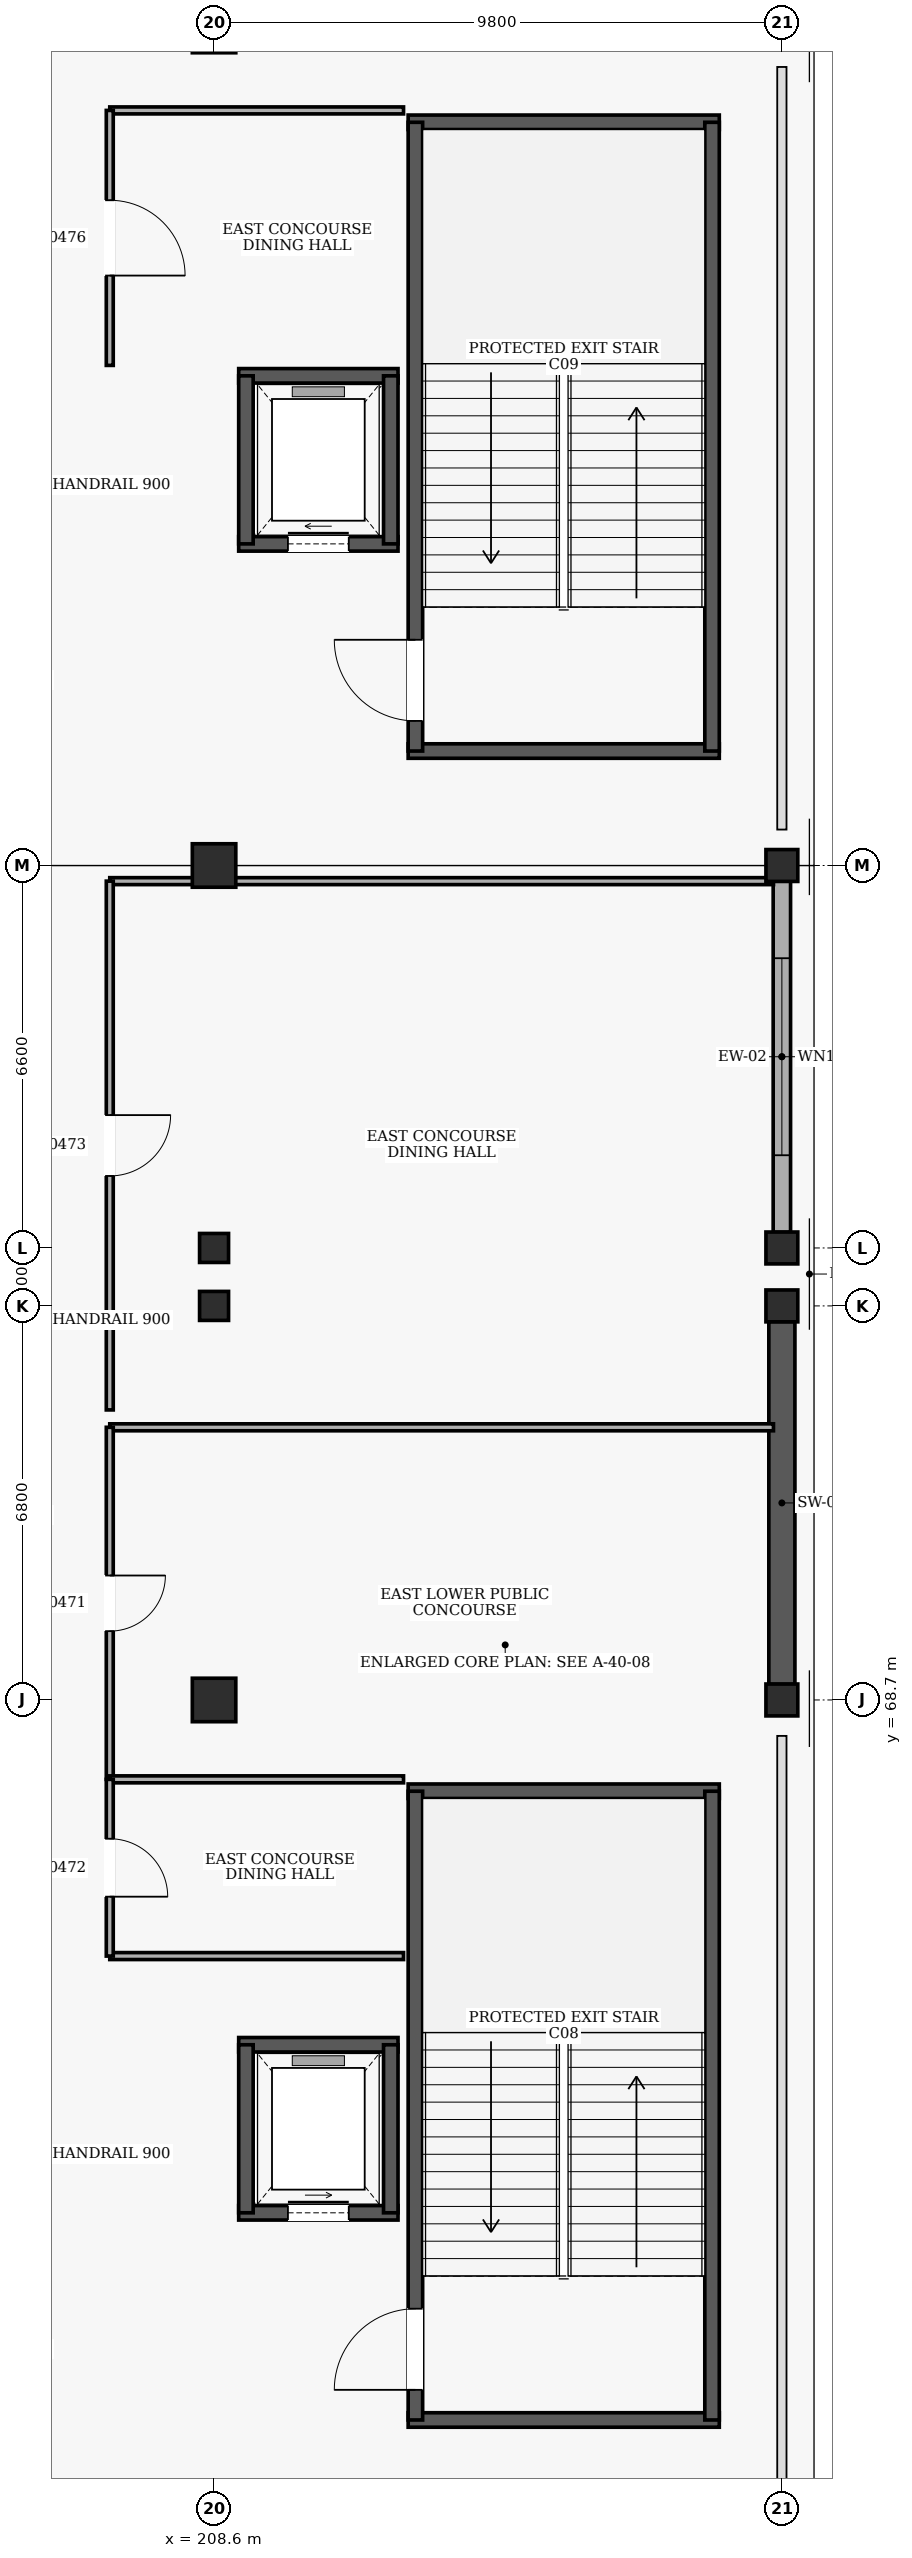
"""IFC4 building model, lengths in metres.
Left out: names, types, materials, properties, quantities, classifications, styles, units other than length and angle.
Written with IfcOpenShell. Run it as: python <this file> out.ifc"""

import sys

from ifc_helpers import new_model, si_unit, direction, frame, frame_2d, origin, origin_2d, place, context, subcontext, project, spatial, rectangle, extrude, element, fill, save


model = new_model("IFC4")
c1 = context("Model", 3, precision=1e-05, world=origin(), true_north=direction((0.0, 1.0)))
c2 = subcontext(c1, "Body", "Model", "MODEL_VIEW")
j1 = project(units=[si_unit("LENGTHUNIT", "METRE"), si_unit("PLANEANGLEUNIT", "RADIAN")], contexts=[c1])
p1 = place(None, origin())
s1 = spatial("IfcSite", under=j1, at=p1, CompositionType="ELEMENT")
p2 = place(p1, origin())
s2 = spatial("IfcBuilding", under=s1, at=p2, CompositionType="ELEMENT")
p3 = place(p2, frame((0.0, 0.0, 5.4)))
s3 = spatial("IfcBuildingStorey", under=s2, at=p3, CompositionType="ELEMENT", Elevation=5.4)
p4 = place(p3, frame((208.6, 68.7, 0.0), z_axis=(0.0, 0.0, 1.0), x_axis=(1.0, 0.0, 0.0)))
e1 = element("IfcColumn", 1, at=p4, inside=s3, PredefinedType="COLUMN", context=c2, shape_type="SweptSolid", body=[
    extrude(rectangle(XDim=0.75, YDim=0.75, at=origin_2d()), origin(), (0.0, 0.0, 1.0), 4.8),
])
for number, where, z_axis, x_axis in (
    (2, (208.6, 75.5, 0.0), (0.0, 0.0, 1.0), (1.0, 0.0, 0.0)),
    (3, (208.6, 76.5, 0.0), (0.0, 0.0, 1.0), (1.0, 0.0, 0.0)),
):
    element("IfcColumn", number, at=place(p3, frame(where, z_axis=z_axis, x_axis=x_axis)), inside=s3, PredefinedType="COLUMN", context=c2, shape_type="SweptSolid", body=[
        extrude(rectangle(XDim=0.5, YDim=0.5, at=origin_2d()), origin(), (0.0, 0.0, 1.0), 4.8),
    ])
for number, where, z_axis, x_axis in (
    (4, (208.6, 83.1, 0.0), (0.0, 0.0, 1.0), (1.0, 0.0, 0.0)),
    (5, (208.6, 97.5, 0.0), (0.0, 0.0, 1.0), (1.0, 0.0, 0.0)),
):
    element("IfcColumn", number, at=place(p3, frame(where, z_axis=z_axis, x_axis=x_axis)), inside=s3, PredefinedType="COLUMN", context=c2, shape_type="SweptSolid", body=[
        extrude(rectangle(XDim=0.75, YDim=0.75, at=origin_2d()), origin(), (0.0, 0.0, 1.0), 4.8),
    ])
for number, where, z_axis, x_axis in (
    (6, (218.4, 68.7, 0.0), (0.0, 0.0, 1.0), (1.0, 0.0, 0.0)),
    (7, (218.4, 75.5, 0.0), (0.0, 0.0, 1.0), (1.0, 0.0, 0.0)),
    (8, (218.4, 76.5, 0.0), (0.0, 0.0, 1.0), (1.0, 0.0, 0.0)),
    (9, (218.4, 83.1, 0.0), (0.0, 0.0, 1.0), (1.0, 0.0, 0.0)),
):
    element("IfcColumn", number, at=place(p3, frame(where, z_axis=z_axis, x_axis=x_axis)), inside=s3, PredefinedType="COLUMN", context=c2, shape_type="SweptSolid", body=[
        extrude(rectangle(XDim=0.55, YDim=0.55, at=origin_2d()), origin(), (0.0, 0.0, 1.0), 4.8),
    ])
p5 = place(p3, frame((218.4, 82.83, 0.0), z_axis=(0.0, 0.0, 1.0), x_axis=(0.0, -1.0, 0.0)))
e10 = element("IfcWall", 10, at=p5, inside=s3, PredefinedType="SOLIDWALL", context=c2, shape_type="SweptSolid", body=[
    extrude(rectangle(XDim=6.06, YDim=0.3, at=frame_2d((3.03, 0.0))), origin(), (0.0, 0.0, 1.0), 3.98),
])
p6 = place(p5, frame((1.33, 0.0, 0.9)))
e11 = element("IfcOpeningElement", 11, at=p6, cuts=e10, PredefinedType="OPENING", context=c2, shape_type="SweptSolid", body=[
    extrude(rectangle(XDim=3.4, YDim=2.1, at=frame_2d((1.7, 1.05))), frame((0.0, 0.16, 0.0), z_axis=(0.0, -1.0, 0.0), x_axis=(1.0, 0.0, 0.0)), (0.0, 0.0, 1.0), 0.32),
])
p7 = place(p3, frame((218.4, 75.23, 0.0), z_axis=(0.0, 0.0, 1.0), x_axis=(0.0, -1.0, 0.0)))
e12 = element("IfcWall", 12, at=p7, inside=s3, PredefinedType="SHEAR", context=c2, shape_type="SweptSolid", body=[
    extrude(rectangle(XDim=6.26, YDim=0.45, at=frame_2d((3.13, 0.0))), origin(), (0.0, 0.0, 1.0), 3.88),
])
for number, where, z_axis, x_axis in (
    (13, (211.95, 56.275, 0.0), (0.0, 0.0, 1.0), (1.0, 0.0, 0.0)),
    (14, (217.32, 67.125, 0.0), (0.0, 0.0, 1.0), (-1.0, 0.0, 0.0)),
):
    element("IfcWall", number, at=place(p3, frame(where, z_axis=z_axis, x_axis=x_axis)), inside=s3, PredefinedType="SHEAR", context=c2, shape_type="SweptSolid", body=[
        extrude(rectangle(XDim=5.37, YDim=0.25, at=frame_2d((2.685, 0.0))), origin(), (0.0, 0.0, 1.0), 4.5),
    ])
p8 = place(p3, frame((212.075, 56.275, 0.0), z_axis=(0.0, 0.0, 1.0), x_axis=(0.0, 1.0, 0.0)))
e15 = element("IfcWall", 15, at=p8, inside=s3, PredefinedType="SHEAR", context=c2, shape_type="SweptSolid", body=[
    extrude(rectangle(XDim=10.85, YDim=0.25, at=frame_2d((5.425, 0.0))), origin(), (0.0, 0.0, 1.0), 4.5),
])
p9 = place(p8, frame((0.52, 0.0, 0.0)))
e16 = element("IfcOpeningElement", 16, at=p9, cuts=e15, PredefinedType="OPENING", context=c2, shape_type="SweptSolid", body=[
    extrude(rectangle(XDim=1.4, YDim=2.15, at=frame_2d((0.7, 1.075))), frame((0.0, 0.135, 0.0), z_axis=(0.0, -1.0, 0.0), x_axis=(1.0, 0.0, 0.0)), (0.0, 0.0, 1.0), 0.27),
])
p10 = place(p3, frame((217.195, 56.275, 0.0), z_axis=(0.0, 0.0, 1.0), x_axis=(0.0, 1.0, 0.0)))
e17 = element("IfcWall", 17, at=p10, inside=s3, PredefinedType="SHEAR", context=c2, shape_type="SweptSolid", body=[
    extrude(rectangle(XDim=10.85, YDim=0.25, at=frame_2d((5.425, 0.0))), origin(), (0.0, 0.0, 1.0), 4.5),
])
for number, where, z_axis, x_axis in (
    (18, (211.95, 85.075, 0.0), (0.0, 0.0, 1.0), (1.0, 0.0, 0.0)),
    (19, (217.32, 95.925, 0.0), (0.0, 0.0, 1.0), (-1.0, 0.0, 0.0)),
):
    element("IfcWall", number, at=place(p3, frame(where, z_axis=z_axis, x_axis=x_axis)), inside=s3, PredefinedType="SHEAR", context=c2, shape_type="SweptSolid", body=[
        extrude(rectangle(XDim=5.37, YDim=0.25, at=frame_2d((2.685, 0.0))), origin(), (0.0, 0.0, 1.0), 4.5),
    ])
p11 = place(p3, frame((212.075, 85.075, 0.0), z_axis=(0.0, 0.0, 1.0), x_axis=(0.0, 1.0, 0.0)))
e20 = element("IfcWall", 20, at=p11, inside=s3, PredefinedType="SHEAR", context=c2, shape_type="SweptSolid", body=[
    extrude(rectangle(XDim=10.85, YDim=0.25, at=frame_2d((5.425, 0.0))), origin(), (0.0, 0.0, 1.0), 4.5),
])
p12 = place(p11, frame((0.52, 0.0, 0.0)))
e21 = element("IfcOpeningElement", 21, at=p12, cuts=e20, PredefinedType="OPENING", context=c2, shape_type="SweptSolid", body=[
    extrude(rectangle(XDim=1.4, YDim=2.15, at=frame_2d((0.7, 1.075))), frame((0.0, 0.135, 0.0), z_axis=(0.0, -1.0, 0.0), x_axis=(1.0, 0.0, 0.0)), (0.0, 0.0, 1.0), 0.27),
])
p13 = place(p3, frame((217.195, 85.075, 0.0), z_axis=(0.0, 0.0, 1.0), x_axis=(0.0, 1.0, 0.0)))
e22 = element("IfcWall", 22, at=p13, inside=s3, PredefinedType="SHEAR", context=c2, shape_type="SweptSolid", body=[
    extrude(rectangle(XDim=10.85, YDim=0.25, at=frame_2d((5.425, 0.0))), origin(), (0.0, 0.0, 1.0), 4.5),
])
p14 = place(p3, frame((209.025, 59.85, 0.0), z_axis=(0.0, 0.0, 1.0), x_axis=(1.0, 0.0, 0.0)))
e23 = element("IfcWall", 23, at=p14, inside=s3, PredefinedType="SHEAR", context=c2, shape_type="SweptSolid", body=[
    extrude(rectangle(XDim=2.75, YDim=0.25, at=frame_2d((1.375, 0.0))), origin(), (0.0, 0.0, 1.0), 4.5),
])
p15 = place(p14, frame((0.85, 0.0, 0.0)))
e24 = element("IfcOpeningElement", 24, at=p15, cuts=e23, PredefinedType="OPENING", context=c2, shape_type="SweptSolid", body=[
    extrude(rectangle(XDim=1.05, YDim=2.15, at=frame_2d((0.525, 1.075))), frame((0.0, 0.135, 0.0), z_axis=(0.0, -1.0, 0.0), x_axis=(1.0, 0.0, 0.0)), (0.0, 0.0, 1.0), 0.27),
])
p16 = place(p3, frame((211.775, 62.75, 0.0), z_axis=(0.0, 0.0, 1.0), x_axis=(-1.0, 0.0, 0.0)))
e25 = element("IfcWall", 25, at=p16, inside=s3, PredefinedType="SHEAR", context=c2, shape_type="SweptSolid", body=[
    extrude(rectangle(XDim=2.75, YDim=0.25, at=frame_2d((1.375, 0.0))), origin(), (0.0, 0.0, 1.0), 4.5),
])
for number, where, z_axis, x_axis in (
    (26, (209.15, 62.75, 0.0), (0.0, 0.0, 1.0), (0.0, -1.0, 0.0)),
    (27, (211.65, 59.85, 0.0), (0.0, 0.0, 1.0), (0.0, 1.0, 0.0)),
):
    element("IfcWall", number, at=place(p3, frame(where, z_axis=z_axis, x_axis=x_axis)), inside=s3, PredefinedType="SHEAR", context=c2, shape_type="SweptSolid", body=[
        extrude(rectangle(XDim=2.9, YDim=0.25, at=frame_2d((1.45, 0.0))), origin(), (0.0, 0.0, 1.0), 4.5),
    ])
p17 = place(p3, frame((209.025, 88.65, 0.0), z_axis=(0.0, 0.0, 1.0), x_axis=(1.0, 0.0, 0.0)))
e28 = element("IfcWall", 28, at=p17, inside=s3, PredefinedType="SHEAR", context=c2, shape_type="SweptSolid", body=[
    extrude(rectangle(XDim=2.75, YDim=0.25, at=frame_2d((1.375, 0.0))), origin(), (0.0, 0.0, 1.0), 4.5),
])
p18 = place(p17, frame((0.85, 0.0, 0.0)))
e29 = element("IfcOpeningElement", 29, at=p18, cuts=e28, PredefinedType="OPENING", context=c2, shape_type="SweptSolid", body=[
    extrude(rectangle(XDim=1.05, YDim=2.15, at=frame_2d((0.525, 1.075))), frame((0.0, 0.135, 0.0), z_axis=(0.0, -1.0, 0.0), x_axis=(1.0, 0.0, 0.0)), (0.0, 0.0, 1.0), 0.27),
])
p19 = place(p3, frame((211.775, 91.55, 0.0), z_axis=(0.0, 0.0, 1.0), x_axis=(-1.0, 0.0, 0.0)))
e30 = element("IfcWall", 30, at=p19, inside=s3, PredefinedType="SHEAR", context=c2, shape_type="SweptSolid", body=[
    extrude(rectangle(XDim=2.75, YDim=0.25, at=frame_2d((1.375, 0.0))), origin(), (0.0, 0.0, 1.0), 4.5),
])
for number, where, z_axis, x_axis in (
    (31, (209.15, 91.55, 0.0), (0.0, 0.0, 1.0), (0.0, -1.0, 0.0)),
    (32, (211.65, 88.65, 0.0), (0.0, 0.0, 1.0), (0.0, 1.0, 0.0)),
):
    element("IfcWall", number, at=place(p3, frame(where, z_axis=z_axis, x_axis=x_axis)), inside=s3, PredefinedType="SHEAR", context=c2, shape_type="SweptSolid", body=[
        extrude(rectangle(XDim=2.9, YDim=0.25, at=frame_2d((1.45, 0.0))), origin(), (0.0, 0.0, 1.0), 4.5),
    ])
p20 = place(p3, frame((218.255, 73.405, 0.0), z_axis=(0.0, 0.0, 1.0), x_axis=(-1.0, 0.0, 0.0)))
e33 = element("IfcWall", 33, at=p20, inside=s3, PredefinedType="PARTITIONING", context=c2, shape_type="SweptSolid", body=[
    extrude(rectangle(XDim=11.455, YDim=0.12, at=frame_2d((5.728, 0.0))), origin(), (0.0, 0.0, 1.0), 4.5),
])
p21 = place(p3, frame((206.8, 73.405, 0.0), z_axis=(0.0, 0.0, 1.0), x_axis=(0.0, -1.0, 0.0)))
e34 = element("IfcWall", 34, at=p21, inside=s3, PredefinedType="PARTITIONING", context=c2, shape_type="SweptSolid", body=[
    extrude(rectangle(XDim=6.075, YDim=0.12, at=frame_2d((3.038, 0.0))), origin(), (0.0, 0.0, 1.0), 4.5),
])
p22 = place(p21, frame((2.558, 0.0, 0.0)))
e35 = element("IfcOpeningElement", 35, at=p22, cuts=e34, PredefinedType="OPENING", context=c2, shape_type="SweptSolid", body=[
    extrude(rectangle(XDim=0.96, YDim=2.1, at=frame_2d((0.48, 1.05))), frame((0.0, 0.07, 0.0), z_axis=(0.0, -1.0, 0.0), x_axis=(1.0, 0.0, 0.0)), (0.0, 0.0, 1.0), 0.14),
])
for number, where, z_axis, x_axis in (
    (36, (206.8, 64.281, 0.0), (0.0, 0.0, 1.0), (1.0, 0.0, 0.0)),
    (37, (211.87, 67.33, 0.0), (0.0, 0.0, 1.0), (-1.0, 0.0, 0.0)),
):
    element("IfcWall", number, at=place(p3, frame(where, z_axis=z_axis, x_axis=x_axis)), inside=s3, PredefinedType="PARTITIONING", context=c2, shape_type="SweptSolid", body=[
        extrude(rectangle(XDim=5.07, YDim=0.12, at=frame_2d((2.535, 0.0))), origin(), (0.0, 0.0, 1.0), 4.5),
    ])
p23 = place(p3, frame((206.8, 67.33, 0.0), z_axis=(0.0, 0.0, 1.0), x_axis=(0.0, -1.0, 0.0)))
e38 = element("IfcWall", 38, at=p23, inside=s3, PredefinedType="PARTITIONING", context=c2, shape_type="SweptSolid", body=[
    extrude(rectangle(XDim=3.05, YDim=0.12, at=frame_2d((1.525, 0.0))), origin(), (0.0, 0.0, 1.0), 4.5),
])
p24 = place(p23, frame((1.025, 0.0, 0.0)))
e39 = element("IfcOpeningElement", 39, at=p24, cuts=e38, PredefinedType="OPENING", context=c2, shape_type="SweptSolid", body=[
    extrude(rectangle(XDim=1.0, YDim=2.1, at=frame_2d((0.5, 1.05))), frame((0.0, 0.07, 0.0), z_axis=(0.0, -1.0, 0.0), x_axis=(1.0, 0.0, 0.0)), (0.0, 0.0, 1.0), 0.14),
])
p25 = place(p3, frame((218.255, 82.83, 0.0), z_axis=(0.0, 0.0, 1.0), x_axis=(-1.0, 0.0, 0.0)))
e40 = element("IfcWall", 40, at=p25, inside=s3, PredefinedType="PARTITIONING", context=c2, shape_type="SweptSolid", body=[
    extrude(rectangle(XDim=11.455, YDim=0.12, at=frame_2d((5.728, 0.0))), origin(), (0.0, 0.0, 1.0), 3.58),
])
p26 = place(p3, frame((206.8, 82.83, 0.0), z_axis=(0.0, 0.0, 1.0), x_axis=(0.0, -1.0, 0.0)))
e41 = element("IfcWall", 41, at=p26, inside=s3, PredefinedType="PARTITIONING", context=c2, shape_type="SweptSolid", body=[
    extrude(rectangle(XDim=9.125, YDim=0.12, at=frame_2d((4.562, 0.0))), origin(), (0.0, 0.0, 1.0), 4.5),
])
p27 = place(p26, frame((4.037, 0.0, 0.0)))
e42 = element("IfcOpeningElement", 42, at=p27, cuts=e41, PredefinedType="OPENING", context=c2, shape_type="SweptSolid", body=[
    extrude(rectangle(XDim=1.05, YDim=2.15, at=frame_2d((0.525, 1.075))), frame((0.0, 0.07, 0.0), z_axis=(0.0, -1.0, 0.0), x_axis=(1.0, 0.0, 0.0)), (0.0, 0.0, 1.0), 0.14),
])
p28 = place(p3, frame((211.87, 96.13, 0.0), z_axis=(0.0, 0.0, 1.0), x_axis=(-1.0, 0.0, 0.0)))
e43 = element("IfcWall", 43, at=p28, inside=s3, PredefinedType="PARTITIONING", context=c2, shape_type="SweptSolid", body=[
    extrude(rectangle(XDim=5.07, YDim=0.12, at=frame_2d((2.535, 0.0))), origin(), (0.0, 0.0, 1.0), 4.5),
])
p29 = place(p3, frame((206.8, 96.13, 0.0), z_axis=(0.0, 0.0, 1.0), x_axis=(0.0, -1.0, 0.0)))
e44 = element("IfcWall", 44, at=p29, inside=s3, PredefinedType="PARTITIONING", context=c2, shape_type="SweptSolid", body=[
    extrude(rectangle(XDim=4.4, YDim=0.12, at=frame_2d((2.2, 0.0))), origin(), (0.0, 0.0, 1.0), 4.5),
])
p30 = place(p29, frame((1.55, 0.0, 0.0)))
e45 = element("IfcOpeningElement", 45, at=p30, cuts=e44, PredefinedType="OPENING", context=c2, shape_type="SweptSolid", body=[
    extrude(rectangle(XDim=1.3, YDim=2.2, at=frame_2d((0.65, 1.1))), frame((0.0, 0.07, 0.0), z_axis=(0.0, -1.0, 0.0), x_axis=(1.0, 0.0, 0.0)), (0.0, 0.0, 1.0), 0.14),
])
p31 = place(p6, origin())
e46 = element("IfcWindow", 46, at=p31, inside=s3, PartitioningType="SINGLE_PANEL", PredefinedType="WINDOW", context=c2, shape_type="SweptSolid", body=[
    extrude(rectangle(XDim=3.4, YDim=2.1, at=frame_2d((1.7, 1.05))), frame((0.0, 0.03, 0.0), z_axis=(0.0, -1.0, 0.0), x_axis=(1.0, 0.0, 0.0)), (0.0, 0.0, 1.0), 0.06),
])
fill(e11, e46)
p32 = place(p9, frame((1.4, 0.0, 0.0), z_axis=(0.0, 0.0, 1.0), x_axis=(-1.0, 0.0, 0.0)))
e47 = element("IfcDoor", 47, at=p32, inside=s3, OperationType="SINGLE_SWING_RIGHT", PredefinedType="DOOR", context=c2, shape_type="SweptSolid", body=[
    extrude(rectangle(XDim=1.4, YDim=2.15, at=frame_2d((0.7, 1.075))), frame((0.0, 0.025, 0.0), z_axis=(0.0, -1.0, 0.0), x_axis=(1.0, 0.0, 0.0)), (0.0, 0.0, 1.0), 0.05),
])
fill(e16, e47)
p33 = place(p12, frame((1.4, 0.0, 0.0), z_axis=(0.0, 0.0, 1.0), x_axis=(-1.0, 0.0, 0.0)))
e48 = element("IfcDoor", 48, at=p33, inside=s3, OperationType="SINGLE_SWING_LEFT", PredefinedType="DOOR", context=c2, shape_type="SweptSolid", body=[
    extrude(rectangle(XDim=1.4, YDim=2.15, at=frame_2d((0.7, 1.075))), frame((0.0, 0.025, 0.0), z_axis=(0.0, -1.0, 0.0), x_axis=(1.0, 0.0, 0.0)), (0.0, 0.0, 1.0), 0.05),
])
fill(e21, e48)
p34 = place(p15, origin())
e49 = element("IfcDoor", 49, at=p34, inside=s3, OperationType="SLIDING_TO_LEFT", PredefinedType="DOOR", context=c2, shape_type="SweptSolid", body=[
    extrude(rectangle(XDim=1.05, YDim=2.15, at=frame_2d((0.525, 1.075))), frame((0.0, 0.025, 0.0), z_axis=(0.0, -1.0, 0.0), x_axis=(1.0, 0.0, 0.0)), (0.0, 0.0, 1.0), 0.05),
])
fill(e24, e49)
p35 = place(p18, origin())
e50 = element("IfcDoor", 50, at=p35, inside=s3, OperationType="SLIDING_TO_RIGHT", PredefinedType="DOOR", context=c2, shape_type="SweptSolid", body=[
    extrude(rectangle(XDim=1.05, YDim=2.15, at=frame_2d((0.525, 1.075))), frame((0.0, 0.025, 0.0), z_axis=(0.0, -1.0, 0.0), x_axis=(1.0, 0.0, 0.0)), (0.0, 0.0, 1.0), 0.05),
])
fill(e29, e50)
p36 = place(p22, origin())
e51 = element("IfcDoor", 51, at=p36, inside=s3, OperationType="SINGLE_SWING_LEFT", PredefinedType="DOOR", context=c2, shape_type="SweptSolid", body=[
    extrude(rectangle(XDim=0.96, YDim=2.1, at=frame_2d((0.48, 1.05))), frame((0.0, 0.025, 0.0), z_axis=(0.0, -1.0, 0.0), x_axis=(1.0, 0.0, 0.0)), (0.0, 0.0, 1.0), 0.05),
])
fill(e35, e51)
p37 = place(p24, origin())
e52 = element("IfcDoor", 52, at=p37, inside=s3, OperationType="SINGLE_SWING_RIGHT", PredefinedType="DOOR", context=c2, shape_type="SweptSolid", body=[
    extrude(rectangle(XDim=1.0, YDim=2.1, at=frame_2d((0.5, 1.05))), frame((0.0, 0.025, 0.0), z_axis=(0.0, -1.0, 0.0), x_axis=(1.0, 0.0, 0.0)), (0.0, 0.0, 1.0), 0.05),
])
fill(e39, e52)
p38 = place(p27, origin())
e53 = element("IfcDoor", 53, at=p38, inside=s3, OperationType="SINGLE_SWING_LEFT", PredefinedType="DOOR", context=c2, shape_type="SweptSolid", body=[
    extrude(rectangle(XDim=1.05, YDim=2.15, at=frame_2d((0.525, 1.075))), frame((0.0, 0.025, 0.0), z_axis=(0.0, -1.0, 0.0), x_axis=(1.0, 0.0, 0.0)), (0.0, 0.0, 1.0), 0.05),
])
fill(e42, e53)
p39 = place(p30, origin())
e54 = element("IfcDoor", 54, at=p39, inside=s3, OperationType="SINGLE_SWING_RIGHT", PredefinedType="DOOR", context=c2, shape_type="SweptSolid", body=[
    extrude(rectangle(XDim=1.3, YDim=2.2, at=frame_2d((0.65, 1.1))), frame((0.0, 0.025, 0.0), z_axis=(0.0, -1.0, 0.0), x_axis=(1.0, 0.0, 0.0)), (0.0, 0.0, 1.0), 0.05),
])
fill(e45, e54)
save(model, sys.argv[1])
